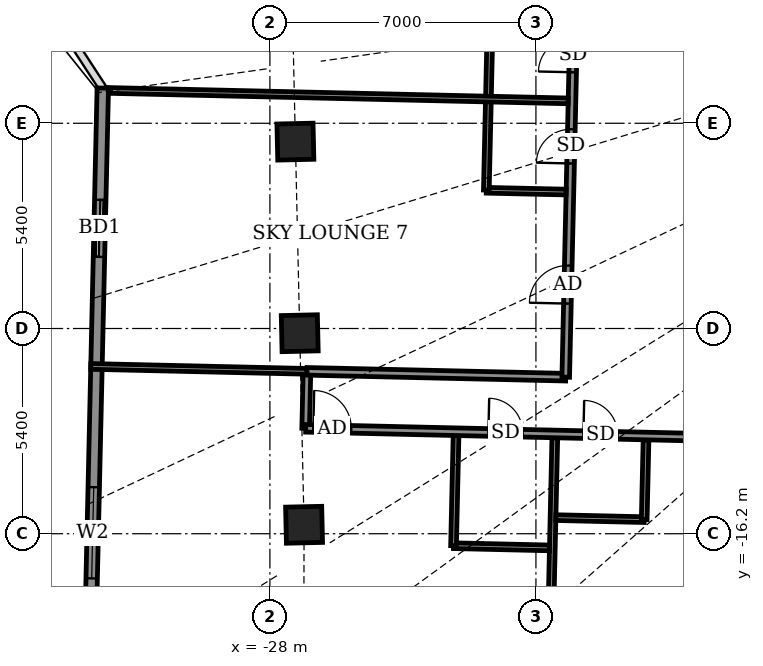
"""IFC4 building model, lengths in metres.
Left out: names, types, materials, properties, quantities, classifications, styles, units other than length and angle.
Written with IfcOpenShell. Run it as: python <this file> out.ifc"""

import sys

from ifc_helpers import new_model, si_unit, direction, frame, frame_2d, origin, origin_2d, place, context, subcontext, project, spatial, rectangle, extrude, element, fill, save


model = new_model("IFC4")
c1 = context("Model", 3, precision=1e-05, world=origin(), true_north=direction((0.0, 1.0)))
c2 = subcontext(c1, "Body", "Model", "MODEL_VIEW")
j1 = project(units=[si_unit("LENGTHUNIT", "METRE"), si_unit("PLANEANGLEUNIT", "RADIAN")], contexts=[c1])
p1 = place(None, origin())
s1 = spatial("IfcSite", under=j1, at=p1, CompositionType="ELEMENT")
p2 = place(p1, origin())
s2 = spatial("IfcBuilding", under=s1, at=p2, CompositionType="ELEMENT")
p3 = place(p2, frame((0.0, 0.0, 301.5)))
s3 = spatial("IfcBuildingStorey", under=s2, at=p3, CompositionType="ELEMENT", Elevation=301.5)
for number, where, z_axis, x_axis in (
    (1, (-27.329, -5.883, -0.55), (0.0, 0.0, 1.0), (0.023, -1.0, 0.0)),
    (2, (-27.215, -10.924, -0.55), (0.0, 0.0, 1.0), (0.023, -1.0, 0.0)),
    (3, (-27.101, -15.964, -0.55), (0.0, 0.0, 1.0), (0.023, -1.0, 0.0)),
):
    element("IfcColumn", number, at=place(p3, frame(where, z_axis=z_axis, x_axis=x_axis)), inside=s3, PredefinedType="COLUMN", context=c2, shape_type="SweptSolid", body=[
        extrude(rectangle(XDim=0.95, YDim=0.95, at=origin_2d()), origin(), (0.0, 0.0, 1.0), 4.6),
    ])
p4 = place(p3, frame((-32.397, -4.474, 0.0), z_axis=(0.0, 0.0, 1.0), x_axis=(-0.022668485183, -0.999743036875, 0.0)))
e4 = element("IfcWall", 4, at=p4, inside=s3, PredefinedType="SOLIDWALL", context=c2, shape_type="SweptSolid", body=[
    extrude(rectangle(XDim=15.929, YDim=0.3, at=frame_2d((7.964, 0.0))), origin(), (0.0, 0.0, 1.0), 2.55),
])
p5 = place(p4, frame((2.942, 0.0, 0.0)))
e5 = element("IfcOpeningElement", 5, at=p5, cuts=e4, PredefinedType="OPENING", context=c2, shape_type="SweptSolid", body=[
    extrude(rectangle(XDim=1.5, YDim=2.4, at=frame_2d((0.75, 1.2))), frame((0.0, 0.16, 0.0), z_axis=(0.0, -1.0, 0.0), x_axis=(1.0, 0.0, 0.0)), (0.0, 0.0, 1.0), 0.32),
])
p6 = place(p4, frame((10.504, 0.0, 0.9)))
e6 = element("IfcOpeningElement", 6, at=p6, cuts=e4, PredefinedType="OPENING", context=c2, shape_type="SweptSolid", body=[
    extrude(rectangle(XDim=2.4, YDim=1.5, at=frame_2d((1.2, 0.75))), frame((0.0, 0.16, 0.0), z_axis=(0.0, -1.0, 0.0), x_axis=(1.0, 0.0, 0.0)), (0.0, 0.0, 1.0), 0.32),
])
p7 = place(p3, frame((-20.762, -25.122, 0.0), z_axis=(0.0, 0.0, 1.0), x_axis=(0.022623082162, 0.999744065325, 0.0)))
e7 = element("IfcWall", 7, at=p7, inside=s3, PredefinedType="PARTITIONING", context=c2, shape_type="SweptSolid", body=[
    extrude(rectangle(XDim=11.45, YDim=0.15, at=frame_2d((5.725, 0.0))), origin(), (0.0, 0.0, 1.0), 2.25),
])
p8 = place(p3, frame((-23.168, -16.515, 0.0), z_axis=(0.0, 0.0, 1.0), x_axis=(0.999735307039, -0.023006865507, 0.0)))
e8 = element("IfcWall", 8, at=p8, inside=s3, PredefinedType="PARTITIONING", context=c2, shape_type="SweptSolid", body=[
    extrude(rectangle(XDim=2.526, YDim=0.15, at=frame_2d((1.263, 0.0))), origin(), (0.0, 0.0, 1.0), 2.55),
])
p9 = place(p3, frame((-23.168, -16.515, 0.0), z_axis=(0.0, 0.0, 1.0), x_axis=(0.022732880677, 0.999741574676, 0.0)))
e9 = element("IfcWall", 9, at=p9, inside=s3, PredefinedType="PARTITIONING", context=c2, shape_type="SweptSolid", body=[
    extrude(rectangle(XDim=2.9, YDim=0.15, at=frame_2d((1.45, 0.0))), origin(), (0.0, 0.0, 1.0), 2.55),
])
p10 = place(p3, frame((-20.475, -15.776, 0.0), z_axis=(0.0, 0.0, 1.0), x_axis=(0.99973791731, -0.022893158191, 0.0)))
e10 = element("IfcWall", 10, at=p10, inside=s3, PredefinedType="PARTITIONING", context=c2, shape_type="SweptSolid", body=[
    extrude(rectangle(XDim=2.325, YDim=0.15, at=frame_2d((1.162, 0.0))), origin(), (0.0, 0.0, 1.0), 2.55),
])
p11 = place(p3, frame((-18.151, -15.829, 0.0), z_axis=(0.0, 0.0, 1.0), x_axis=(0.02279007832, 0.999740272436, 0.0)))
e11 = element("IfcWall", 11, at=p11, inside=s3, PredefinedType="PARTITIONING", context=c2, shape_type="SweptSolid", body=[
    extrude(rectangle(XDim=2.1, YDim=0.15, at=frame_2d((1.05, 0.0))), origin(), (0.0, 0.0, 1.0), 2.55),
])
p12 = place(p3, frame((-27.059, -13.426, 0.0), z_axis=(0.0, 0.0, 1.0), x_axis=(0.02279537805, 0.999740151609, 0.0)))
e12 = element("IfcWall", 12, at=p12, inside=s3, PredefinedType="PARTITIONING", context=c2, shape_type="SweptSolid", body=[
    extrude(rectangle(XDim=1.5, YDim=0.2, at=frame_2d((0.75, 0.0))), origin(), (0.0, 0.0, 1.0), 2.25),
])
p13 = place(p3, frame((-27.058, -13.426, 0.0), z_axis=(0.0, 0.0, 1.0), x_axis=(0.999742445627, -0.022694545867, 0.0)))
e13 = element("IfcWall", 13, at=p13, inside=s3, PredefinedType="PARTITIONING", context=c2, shape_type="SweptSolid", body=[
    extrude(rectangle(XDim=54.509, YDim=0.2, at=frame_2d((27.255, 0.0))), origin(), (0.0, 0.0, 1.0), 2.15),
])
p14 = place(p13, frame((0.2, 0.0, 0.0)))
e14 = element("IfcOpeningElement", 14, at=p14, cuts=e13, PredefinedType="OPENING", context=c2, shape_type="SweptSolid", body=[
    extrude(rectangle(XDim=1.0, YDim=2.1, at=frame_2d((0.5, 1.05))), frame((0.0, 0.11, 0.0), z_axis=(0.0, -1.0, 0.0), x_axis=(1.0, 0.0, 0.0)), (0.0, 0.0, 1.0), 0.22),
])
p15 = place(p13, frame((4.809, 0.0, 0.0)))
e15 = element("IfcOpeningElement", 15, at=p15, cuts=e13, PredefinedType="OPENING", context=c2, shape_type="SweptSolid", body=[
    extrude(rectangle(XDim=0.9, YDim=2.1, at=frame_2d((0.45, 1.05))), frame((0.0, 0.11, 0.0), z_axis=(0.0, -1.0, 0.0), x_axis=(1.0, 0.0, 0.0)), (0.0, 0.0, 1.0), 0.22),
])
p16 = place(p13, frame((10.309, 0.0, 0.0)))
e16 = element("IfcOpeningElement", 16, at=p16, cuts=e13, PredefinedType="OPENING", context=c2, shape_type="SweptSolid", body=[
    extrude(rectangle(XDim=1.0, YDim=2.1, at=frame_2d((0.5, 1.05))), frame((0.0, 0.11, 0.0), z_axis=(0.0, -1.0, 0.0), x_axis=(1.0, 0.0, 0.0)), (0.0, 0.0, 1.0), 0.22),
])
p17 = place(p13, frame((7.309, 0.0, 0.0)))
e17 = element("IfcOpeningElement", 17, at=p17, cuts=e13, PredefinedType="OPENING", context=c2, shape_type="SweptSolid", body=[
    extrude(rectangle(XDim=0.9, YDim=2.1, at=frame_2d((0.45, 1.05))), frame((0.0, 0.11, 0.0), z_axis=(0.0, -1.0, 0.0), x_axis=(1.0, 0.0, 0.0)), (0.0, 0.0, 1.0), 0.22),
])
p18 = place(p13, frame((14.759, 0.0, 0.0)))
e18 = element("IfcOpeningElement", 18, at=p18, cuts=e13, PredefinedType="OPENING", context=c2, shape_type="SweptSolid", body=[
    extrude(rectangle(XDim=1.0, YDim=2.1, at=frame_2d((0.5, 1.05))), frame((0.0, 0.11, 0.0), z_axis=(0.0, -1.0, 0.0), x_axis=(1.0, 0.0, 0.0)), (0.0, 0.0, 1.0), 0.22),
])
p19 = place(p13, frame((18.609, 0.0, 0.0)))
e19 = element("IfcOpeningElement", 19, at=p19, cuts=e13, PredefinedType="OPENING", context=c2, shape_type="SweptSolid", body=[
    extrude(rectangle(XDim=0.9, YDim=2.1, at=frame_2d((0.45, 1.05))), frame((0.0, 0.11, 0.0), z_axis=(0.0, -1.0, 0.0), x_axis=(1.0, 0.0, 0.0)), (0.0, 0.0, 1.0), 0.22),
])
p20 = place(p13, frame((23.509, 0.0, 0.0)))
e20 = element("IfcOpeningElement", 20, at=p20, cuts=e13, PredefinedType="OPENING", context=c2, shape_type="SweptSolid", body=[
    extrude(rectangle(XDim=0.9, YDim=2.1, at=frame_2d((0.45, 1.05))), frame((0.0, 0.11, 0.0), z_axis=(0.0, -1.0, 0.0), x_axis=(1.0, 0.0, 0.0)), (0.0, 0.0, 1.0), 0.22),
])
p21 = place(p13, frame((26.109, 0.0, 0.0)))
e21 = element("IfcOpeningElement", 21, at=p21, cuts=e13, PredefinedType="OPENING", context=c2, shape_type="SweptSolid", body=[
    extrude(rectangle(XDim=0.9, YDim=2.1, at=frame_2d((0.45, 1.05))), frame((0.0, 0.11, 0.0), z_axis=(0.0, -1.0, 0.0), x_axis=(1.0, 0.0, 0.0)), (0.0, 0.0, 1.0), 0.22),
])
p22 = place(p13, frame((34.009, 0.0, 0.0)))
e22 = element("IfcOpeningElement", 22, at=p22, cuts=e13, PredefinedType="OPENING", context=c2, shape_type="SweptSolid", body=[
    extrude(rectangle(XDim=1.0, YDim=2.1, at=frame_2d((0.5, 1.05))), frame((0.0, 0.11, 0.0), z_axis=(0.0, -1.0, 0.0), x_axis=(1.0, 0.0, 0.0)), (0.0, 0.0, 1.0), 0.22),
])
p23 = place(p13, frame((41.234, 0.0, 0.0)))
e23 = element("IfcOpeningElement", 23, at=p23, cuts=e13, PredefinedType="OPENING", context=c2, shape_type="SweptSolid", body=[
    extrude(rectangle(XDim=1.0, YDim=2.1, at=frame_2d((0.5, 1.05))), frame((0.0, 0.11, 0.0), z_axis=(0.0, -1.0, 0.0), x_axis=(1.0, 0.0, 0.0)), (0.0, 0.0, 1.0), 0.22),
])
p24 = place(p13, frame((45.559, 0.0, 0.0)))
e24 = element("IfcOpeningElement", 24, at=p24, cuts=e13, PredefinedType="OPENING", context=c2, shape_type="SweptSolid", body=[
    extrude(rectangle(XDim=0.9, YDim=2.1, at=frame_2d((0.45, 1.05))), frame((0.0, 0.11, 0.0), z_axis=(0.0, -1.0, 0.0), x_axis=(1.0, 0.0, 0.0)), (0.0, 0.0, 1.0), 0.22),
])
p25 = place(p13, frame((50.587, 0.0, 0.0)))
e25 = element("IfcOpeningElement", 25, at=p25, cuts=e13, PredefinedType="OPENING", context=c2, shape_type="SweptSolid", body=[
    extrude(rectangle(XDim=1.0, YDim=2.1, at=frame_2d((0.5, 1.05))), frame((0.0, 0.11, 0.0), z_axis=(0.0, -1.0, 0.0), x_axis=(1.0, 0.0, 0.0)), (0.0, 0.0, 1.0), 0.22),
])
p26 = place(p3, frame((-32.713, -11.798, 0.0), z_axis=(0.0, 0.0, 1.0), x_axis=(0.999743383689, -0.022653184559, 0.0)))
e26 = element("IfcWall", 26, at=p26, inside=s3, PredefinedType="PARTITIONING", context=c2, shape_type="SweptSolid", body=[
    extrude(rectangle(XDim=5.69, YDim=0.15, at=frame_2d((2.845, 0.0))), origin(), (0.0, 0.0, 1.0), 2.25),
])
p27 = place(p3, frame((-27.024, -11.927, 0.0), z_axis=(0.0, 0.0, 1.0), x_axis=(0.999744070306, -0.022622862054, 0.0)))
e27 = element("IfcWall", 27, at=p27, inside=s3, PredefinedType="PARTITIONING", context=c2, shape_type="SweptSolid", body=[
    extrude(rectangle(XDim=6.81, YDim=0.2, at=frame_2d((3.405, 0.0))), origin(), (0.0, 0.0, 1.0), 2.25),
])
p28 = place(p3, frame((-20.216, -12.081, 0.0), z_axis=(0.0, 0.0, 1.0), x_axis=(0.02267447203, 0.999742901109, 0.0)))
e28 = element("IfcWall", 28, at=p28, inside=s3, PredefinedType="PARTITIONING", context=c2, shape_type="SweptSolid", body=[
    extrude(rectangle(XDim=27.65, YDim=0.2, at=frame_2d((13.825, 0.0))), origin(), (0.0, 0.0, 1.0), 2.25),
])
p29 = place(p28, frame((22.638, 0.0, 0.0)))
e29 = element("IfcOpeningElement", 29, at=p29, cuts=e28, PredefinedType="OPENING", context=c2, shape_type="SweptSolid", body=[
    extrude(rectangle(XDim=1.0, YDim=2.1, at=frame_2d((0.5, 1.05))), frame((0.0, 0.11, 0.0), z_axis=(0.0, -1.0, 0.0), x_axis=(1.0, 0.0, 0.0)), (0.0, 0.0, 1.0), 0.22),
])
p30 = place(p28, frame((26.0, 0.0, 0.0)))
e30 = element("IfcOpeningElement", 30, at=p30, cuts=e28, PredefinedType="OPENING", context=c2, shape_type="SweptSolid", body=[
    extrude(rectangle(XDim=0.9, YDim=2.1, at=frame_2d((0.45, 1.05))), frame((0.0, 0.11, 0.0), z_axis=(0.0, -1.0, 0.0), x_axis=(1.0, 0.0, 0.0)), (0.0, 0.0, 1.0), 0.22),
])
p31 = place(p28, frame((15.55, 0.0, 0.0)))
e31 = element("IfcOpeningElement", 31, at=p31, cuts=e28, PredefinedType="OPENING", context=c2, shape_type="SweptSolid", body=[
    extrude(rectangle(XDim=1.0, YDim=2.1, at=frame_2d((0.5, 1.05))), frame((0.0, 0.11, 0.0), z_axis=(0.0, -1.0, 0.0), x_axis=(1.0, 0.0, 0.0)), (0.0, 0.0, 1.0), 0.22),
])
p32 = place(p28, frame((19.375, 0.0, 0.0)))
e32 = element("IfcOpeningElement", 32, at=p32, cuts=e28, PredefinedType="OPENING", context=c2, shape_type="SweptSolid", body=[
    extrude(rectangle(XDim=0.9, YDim=2.1, at=frame_2d((0.45, 1.05))), frame((0.0, 0.11, 0.0), z_axis=(0.0, -1.0, 0.0), x_axis=(1.0, 0.0, 0.0)), (0.0, 0.0, 1.0), 0.22),
])
p33 = place(p28, frame((11.075, 0.0, 0.0)))
e33 = element("IfcOpeningElement", 33, at=p33, cuts=e28, PredefinedType="OPENING", context=c2, shape_type="SweptSolid", body=[
    extrude(rectangle(XDim=1.0, YDim=2.1, at=frame_2d((0.5, 1.05))), frame((0.0, 0.11, 0.0), z_axis=(0.0, -1.0, 0.0), x_axis=(1.0, 0.0, 0.0)), (0.0, 0.0, 1.0), 0.22),
])
p34 = place(p28, frame((8.025, 0.0, 0.0)))
e34 = element("IfcOpeningElement", 34, at=p34, cuts=e28, PredefinedType="OPENING", context=c2, shape_type="SweptSolid", body=[
    extrude(rectangle(XDim=0.9, YDim=2.1, at=frame_2d((0.45, 1.05))), frame((0.0, 0.11, 0.0), z_axis=(0.0, -1.0, 0.0), x_axis=(1.0, 0.0, 0.0)), (0.0, 0.0, 1.0), 0.22),
])
p35 = place(p28, frame((1.937, 0.0, 0.0)))
e35 = element("IfcOpeningElement", 35, at=p35, cuts=e28, PredefinedType="OPENING", context=c2, shape_type="SweptSolid", body=[
    extrude(rectangle(XDim=1.0, YDim=2.1, at=frame_2d((0.5, 1.05))), frame((0.0, 0.11, 0.0), z_axis=(0.0, -1.0, 0.0), x_axis=(1.0, 0.0, 0.0)), (0.0, 0.0, 1.0), 0.22),
])
p36 = place(p28, frame((5.625, 0.0, 0.0)))
e36 = element("IfcOpeningElement", 36, at=p36, cuts=e28, PredefinedType="OPENING", context=c2, shape_type="SweptSolid", body=[
    extrude(rectangle(XDim=0.9, YDim=2.1, at=frame_2d((0.45, 1.05))), frame((0.0, 0.11, 0.0), z_axis=(0.0, -1.0, 0.0), x_axis=(1.0, 0.0, 0.0)), (0.0, 0.0, 1.0), 0.22),
])
p37 = place(p3, frame((-22.305, -7.163, 0.0), z_axis=(0.0, 0.0, 1.0), x_axis=(0.999750703499, -0.022327804475, 0.0)))
e37 = element("IfcWall", 37, at=p37, inside=s3, PredefinedType="PARTITIONING", context=c2, shape_type="SweptSolid", body=[
    extrude(rectangle(XDim=2.099, YDim=0.15, at=frame_2d((1.05, 0.0))), origin(), (0.0, 0.0, 1.0), 2.75),
])
p38 = place(p3, frame((-22.305, -7.158, 0.0), z_axis=(0.0, 0.0, 1.0), x_axis=(0.022683280499, 0.999742701292, 0.0)))
e38 = element("IfcWall", 38, at=p38, inside=s3, PredefinedType="PARTITIONING", context=c2, shape_type="SweptSolid", body=[
    extrude(rectangle(XDim=4.8, YDim=0.15, at=frame_2d((2.4, 0.0))), origin(), (0.0, 0.0, 1.0), 2.75),
])
p39 = place(p3, frame((-32.248, -4.536, 0.0), z_axis=(0.0, 0.0, 1.0), x_axis=(0.999741439573, -0.022738821441, 0.0)))
e39 = element("IfcWall", 39, at=p39, inside=s3, PredefinedType="PARTITIONING", context=c2, shape_type="SweptSolid", body=[
    extrude(rectangle(XDim=12.1, YDim=0.15, at=frame_2d((6.05, 0.0))), origin(), (0.0, 0.0, 1.0), 2.25),
])
p40 = place(p5, origin())
e40 = element("IfcDoor", 40, at=p40, inside=s3, OperationType="SLIDING_TO_LEFT", PredefinedType="DOOR", context=c2, shape_type="SweptSolid", body=[
    extrude(rectangle(XDim=1.5, YDim=2.4, at=frame_2d((0.75, 1.2))), frame((0.0, 0.025, 0.0), z_axis=(0.0, -1.0, 0.0), x_axis=(1.0, 0.0, 0.0)), (0.0, 0.0, 1.0), 0.05),
])
fill(e5, e40)
p41 = place(p6, origin())
e41 = element("IfcWindow", 41, at=p41, inside=s3, PartitioningType="DOUBLE_PANEL_VERTICAL", PredefinedType="WINDOW", context=c2, shape_type="SweptSolid", body=[
    extrude(rectangle(XDim=2.4, YDim=1.5, at=frame_2d((1.2, 0.75))), frame((0.0, 0.03, 0.0), z_axis=(0.0, -1.0, 0.0), x_axis=(1.0, 0.0, 0.0)), (0.0, 0.0, 1.0), 0.06),
])
fill(e6, e41)
p42 = place(p14, origin())
e42 = element("IfcDoor", 42, at=p42, inside=s3, OperationType="SINGLE_SWING_LEFT", PredefinedType="DOOR", context=c2, shape_type="SweptSolid", body=[
    extrude(rectangle(XDim=1.0, YDim=2.1, at=frame_2d((0.5, 1.05))), frame((0.0, 0.025, 0.0), z_axis=(0.0, -1.0, 0.0), x_axis=(1.0, 0.0, 0.0)), (0.0, 0.0, 1.0), 0.05),
])
fill(e14, e42)
p43 = place(p15, origin())
e43 = element("IfcDoor", 43, at=p43, inside=s3, OperationType="SINGLE_SWING_LEFT", PredefinedType="DOOR", context=c2, shape_type="SweptSolid", body=[
    extrude(rectangle(XDim=0.9, YDim=2.1, at=frame_2d((0.45, 1.05))), frame((0.0, 0.025, 0.0), z_axis=(0.0, -1.0, 0.0), x_axis=(1.0, 0.0, 0.0)), (0.0, 0.0, 1.0), 0.05),
])
fill(e15, e43)
p44 = place(p17, origin())
e44 = element("IfcDoor", 44, at=p44, inside=s3, OperationType="SINGLE_SWING_RIGHT", PredefinedType="DOOR", context=c2, shape_type="SweptSolid", body=[
    extrude(rectangle(XDim=0.9, YDim=2.1, at=frame_2d((0.45, 1.05))), frame((0.0, 0.025, 0.0), z_axis=(0.0, -1.0, 0.0), x_axis=(1.0, 0.0, 0.0)), (0.0, 0.0, 1.0), 0.05),
])
fill(e17, e44)
p45 = place(p34, origin())
e45 = element("IfcDoor", 45, at=p45, inside=s3, OperationType="SINGLE_SWING_RIGHT", PredefinedType="DOOR", context=c2, shape_type="SweptSolid", body=[
    extrude(rectangle(XDim=0.9, YDim=2.1, at=frame_2d((0.45, 1.05))), frame((0.0, 0.025, 0.0), z_axis=(0.0, -1.0, 0.0), x_axis=(1.0, 0.0, 0.0)), (0.0, 0.0, 1.0), 0.05),
])
fill(e34, e45)
p46 = place(p35, origin())
e46 = element("IfcDoor", 46, at=p46, inside=s3, OperationType="SINGLE_SWING_RIGHT", PredefinedType="DOOR", context=c2, shape_type="SweptSolid", body=[
    extrude(rectangle(XDim=1.0, YDim=2.1, at=frame_2d((0.5, 1.05))), frame((0.0, 0.025, 0.0), z_axis=(0.0, -1.0, 0.0), x_axis=(1.0, 0.0, 0.0)), (0.0, 0.0, 1.0), 0.05),
])
fill(e35, e46)
p47 = place(p36, origin())
e47 = element("IfcDoor", 47, at=p47, inside=s3, OperationType="SINGLE_SWING_LEFT", PredefinedType="DOOR", context=c2, shape_type="SweptSolid", body=[
    extrude(rectangle(XDim=0.9, YDim=2.1, at=frame_2d((0.45, 1.05))), frame((0.0, 0.025, 0.0), z_axis=(0.0, -1.0, 0.0), x_axis=(1.0, 0.0, 0.0)), (0.0, 0.0, 1.0), 0.05),
])
fill(e36, e47)
save(model, sys.argv[1])
